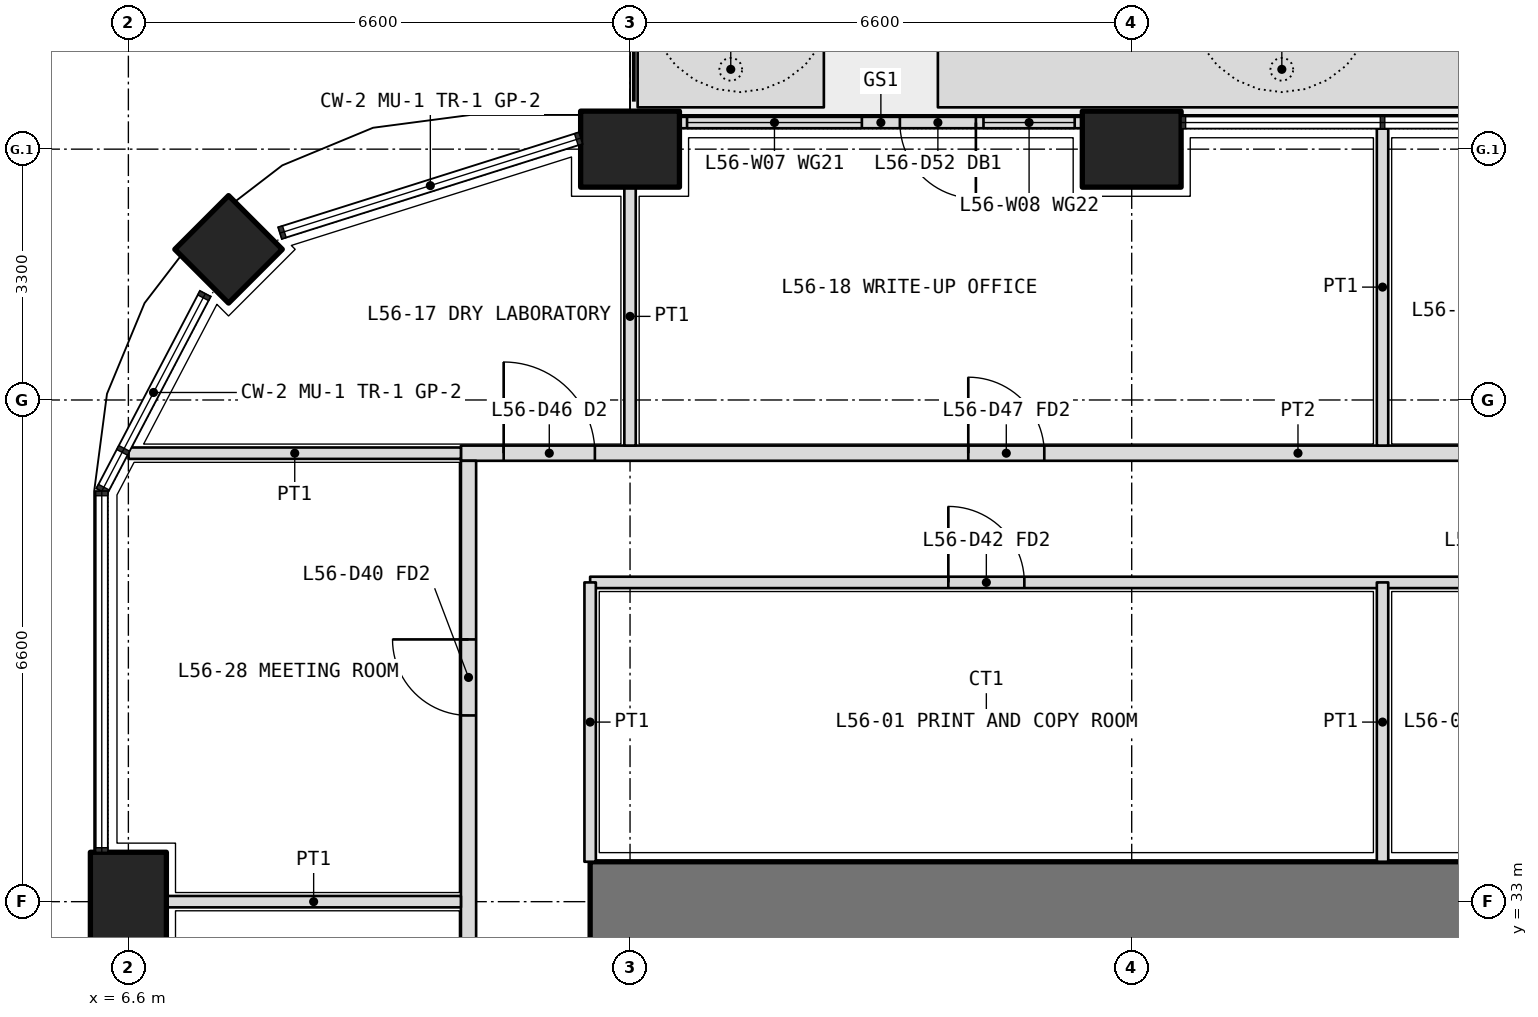
"""IFC4 building model, lengths in metres.
Left out: names, types, materials, properties, quantities, classifications, styles, units other than length and angle.
Written with IfcOpenShell. Run it as: python <this file> out.ifc"""

import sys

from ifc_helpers import new_model, si_unit, direction, frame, frame_2d, origin, origin_2d, place, context, subcontext, project, spatial, polyline, rectangle, outline, extrude, element, fill, save


model = new_model("IFC4")
c1 = context("Model", 3, precision=1e-05, world=origin(), true_north=direction((0.0, 1.0)))
c2 = subcontext(c1, "Body", "Model", "MODEL_VIEW")
j1 = project(units=[si_unit("LENGTHUNIT", "METRE"), si_unit("PLANEANGLEUNIT", "RADIAN")], contexts=[c1])
p1 = place(None, origin())
s1 = spatial("IfcSite", under=j1, at=p1, CompositionType="ELEMENT")
p2 = place(p1, origin())
s2 = spatial("IfcBuilding", under=s1, at=p2, CompositionType="ELEMENT")
p3 = place(p2, frame((0.0, 0.0, 246.0)))
s3 = spatial("IfcBuildingStorey", under=s2, at=p3, CompositionType="ELEMENT", Elevation=246.0)
p4 = place(p3, frame((7.918, 41.582, 0.0), z_axis=(0.0, 0.0, 1.0), x_axis=(0.707106781187, 0.707106781187, 0.0)))
e1 = element("IfcColumn", 1, at=p4, inside=s3, PredefinedType="COLUMN", context=c2, shape_type="SweptSolid", body=[
    extrude(rectangle(XDim=1.0, YDim=1.0, at=origin_2d()), origin(), (0.0, 0.0, 1.0), 4.2),
])
for number, where, z_axis, x_axis in (
    (2, (6.6, 33.0, 0.0), (0.0, 0.0, 1.0), (0.0, 1.0, 0.0)),
    (3, (13.2, 42.9, 0.0), (0.0, 0.0, 1.0), (1.0, 0.0, 0.0)),
    (4, (19.8, 42.9, 0.0), (0.0, 0.0, 1.0), (1.0, 0.0, 0.0)),
):
    element("IfcColumn", number, at=place(p3, frame(where, z_axis=z_axis, x_axis=x_axis)), inside=s3, PredefinedType="COLUMN", context=c2, shape_type="SweptSolid", body=[
        extrude(rectangle(XDim=1.3, YDim=1.0, at=origin_2d()), origin(), (0.0, 0.0, 1.0), 4.2),
    ])
p5 = place(p3, origin())
e5 = element("IfcWall", 5, at=p5, inside=s3, PredefinedType="USERDEFINED", context=c2, shape_type="SweptSolid", body=[
    extrude(outline(polyline([(13.3, 43.45), (15.75, 43.45), (15.75, 44.45), (13.3, 44.45), (13.3, 43.45)]), holes=[polyline([(13.45, 43.6), (15.6, 43.6), (15.6, 44.3), (13.45, 44.3), (13.45, 43.6)])]), origin(), (0.0, 0.0, 1.0), 1.05),
])
p6 = place(p3, origin())
e6 = element("IfcWall", 6, at=p6, inside=s3, PredefinedType="USERDEFINED", context=c2, shape_type="SweptSolid", body=[
    extrude(outline(polyline([(17.25, 43.45), (26.3, 43.45), (26.3, 44.45), (17.25, 44.45), (17.25, 43.45)]), holes=[polyline([(17.4, 43.6), (26.15, 43.6), (26.15, 44.3), (17.4, 44.3), (17.4, 43.6)])]), origin(), (0.0, 0.0, 1.0), 1.05),
])
p7 = place(p3, frame((19.15, 43.25, 0.0), z_axis=(0.0, 0.0, 1.0), x_axis=(-1.0, 0.0, 0.0)))
e7 = element("IfcWall", 7, at=p7, inside=s3, PredefinedType="SOLIDWALL", context=c2, shape_type="SweptSolid", body=[
    extrude(rectangle(XDim=5.3, YDim=0.15, at=frame_2d((2.65, 0.0))), origin(), (0.0, 0.0, 1.0), 2.7),
])
p8 = place(p7, frame((1.4, 0.0, 0.0)))
e8 = element("IfcOpeningElement", 8, at=p8, cuts=e7, PredefinedType="OPENING", context=c2, shape_type="SweptSolid", body=[
    extrude(rectangle(XDim=1.0, YDim=2.4, at=frame_2d((0.5, 1.2))), frame((0.0, 0.085, 0.0), z_axis=(0.0, -1.0, 0.0), x_axis=(1.0, 0.0, 0.0)), (0.0, 0.0, 1.0), 0.17),
])
p9 = place(p7, frame((0.1, 0.0, 0.1)))
e9 = element("IfcOpeningElement", 9, at=p9, cuts=e7, PredefinedType="OPENING", context=c2, shape_type="SweptSolid", body=[
    extrude(rectangle(XDim=1.2, YDim=2.3, at=frame_2d((0.6, 1.15))), frame((0.0, 0.085, 0.0), z_axis=(0.0, -1.0, 0.0), x_axis=(1.0, 0.0, 0.0)), (0.0, 0.0, 1.0), 0.17),
])
p10 = place(p7, frame((2.9, 0.0, 0.1)))
e10 = element("IfcOpeningElement", 10, at=p10, cuts=e7, PredefinedType="OPENING", context=c2, shape_type="SweptSolid", body=[
    extrude(rectangle(XDim=2.3, YDim=2.3, at=frame_2d((1.15, 1.15))), frame((0.0, 0.085, 0.0), z_axis=(0.0, -1.0, 0.0), x_axis=(1.0, 0.0, 0.0)), (0.0, 0.0, 1.0), 0.17),
])
p11 = place(p3, frame((40.125, 33.0, 0.0), z_axis=(0.0, 0.0, 1.0), x_axis=(-1.0, 0.0, 0.0)))
e11 = element("IfcWall", 11, at=p11, inside=s3, PredefinedType="SHEAR", context=c2, shape_type="SweptSolid", body=[
    extrude(rectangle(XDim=27.45, YDim=1.05, at=frame_2d((13.725, 0.0))), origin(), (0.0, 0.0, 1.0), 4.2),
])
p12 = place(p3, frame((12.675, 37.2, 0.0), z_axis=(0.0, 0.0, 1.0), x_axis=(1.0, 0.0, 0.0)))
e12 = element("IfcWall", 12, at=p12, inside=s3, PredefinedType="PARTITIONING", context=c2, shape_type="SweptSolid", body=[
    extrude(rectangle(XDim=27.45, YDim=0.15, at=frame_2d((13.725, 0.0))), origin(), (0.0, 0.0, 1.0), 3.0),
])
p13 = place(p12, frame((4.712, 0.0, 0.0)))
e13 = element("IfcOpeningElement", 13, at=p13, cuts=e12, PredefinedType="OPENING", context=c2, shape_type="SweptSolid", body=[
    extrude(rectangle(XDim=1.0, YDim=2.1, at=frame_2d((0.5, 1.05))), frame((0.0, 0.085, 0.0), z_axis=(0.0, -1.0, 0.0), x_axis=(1.0, 0.0, 0.0)), (0.0, 0.0, 1.0), 0.17),
])
p14 = place(p12, frame((11.575, 0.0, 0.0)))
e14 = element("IfcOpeningElement", 14, at=p14, cuts=e12, PredefinedType="OPENING", context=c2, shape_type="SweptSolid", body=[
    extrude(rectangle(XDim=1.0, YDim=2.1, at=frame_2d((0.5, 1.05))), frame((0.0, 0.085, 0.0), z_axis=(0.0, -1.0, 0.0), x_axis=(1.0, 0.0, 0.0)), (0.0, 0.0, 1.0), 0.17),
])
p15 = place(p12, frame((18.175, 0.0, 0.0)))
e15 = element("IfcOpeningElement", 15, at=p15, cuts=e12, PredefinedType="OPENING", context=c2, shape_type="SweptSolid", body=[
    extrude(rectangle(XDim=1.0, YDim=2.1, at=frame_2d((0.5, 1.05))), frame((0.0, 0.085, 0.0), z_axis=(0.0, -1.0, 0.0), x_axis=(1.0, 0.0, 0.0)), (0.0, 0.0, 1.0), 0.17),
])
p16 = place(p12, frame((25.038, 0.0, 0.0)))
e16 = element("IfcOpeningElement", 16, at=p16, cuts=e12, PredefinedType="OPENING", context=c2, shape_type="SweptSolid", body=[
    extrude(rectangle(XDim=1.0, YDim=2.1, at=frame_2d((0.5, 1.05))), frame((0.0, 0.085, 0.0), z_axis=(0.0, -1.0, 0.0), x_axis=(1.0, 0.0, 0.0)), (0.0, 0.0, 1.0), 0.17),
])
p17 = place(p3, frame((12.675, 33.525, 0.0), z_axis=(0.0, 0.0, 1.0), x_axis=(0.0, 1.0, 0.0)))
e17 = element("IfcWall", 17, at=p17, inside=s3, PredefinedType="PARTITIONING", context=c2, shape_type="SweptSolid", body=[
    extrude(rectangle(XDim=3.675, YDim=0.15, at=frame_2d((1.837, 0.0))), origin(), (0.0, 0.0, 1.0), 3.0),
])
p18 = place(p3, frame((23.1, 33.525, 0.0), z_axis=(0.0, 0.0, 1.0), x_axis=(0.0, 1.0, 0.0)))
e18 = element("IfcWall", 18, at=p18, inside=s3, PredefinedType="PARTITIONING", context=c2, shape_type="SweptSolid", body=[
    extrude(rectangle(XDim=3.675, YDim=0.15, at=frame_2d((1.837, 0.0))), origin(), (0.0, 0.0, 1.0), 3.9),
])
p19 = place(p3, frame((10.975, 38.9, 0.0), z_axis=(0.0, 0.0, 1.0), x_axis=(1.0, 0.0, 0.0)))
e19 = element("IfcWall", 19, at=p19, inside=s3, PredefinedType="PARTITIONING", context=c2, shape_type="SweptSolid", body=[
    extrude(rectangle(XDim=22.025, YDim=0.2, at=frame_2d((11.012, 0.0))), origin(), (0.0, 0.0, 1.0), 3.0),
])
p20 = place(p19, frame((0.562, 0.0, 0.0)))
e20 = element("IfcOpeningElement", 20, at=p20, cuts=e19, PredefinedType="OPENING", context=c2, shape_type="SweptSolid", body=[
    extrude(rectangle(XDim=1.2, YDim=2.1, at=frame_2d((0.6, 1.05))), frame((0.0, 0.11, 0.0), z_axis=(0.0, -1.0, 0.0), x_axis=(1.0, 0.0, 0.0)), (0.0, 0.0, 1.0), 0.22),
])
p21 = place(p19, frame((6.675, 0.0, 0.0)))
e21 = element("IfcOpeningElement", 21, at=p21, cuts=e19, PredefinedType="OPENING", context=c2, shape_type="SweptSolid", body=[
    extrude(rectangle(XDim=1.0, YDim=2.1, at=frame_2d((0.5, 1.05))), frame((0.0, 0.11, 0.0), z_axis=(0.0, -1.0, 0.0), x_axis=(1.0, 0.0, 0.0)), (0.0, 0.0, 1.0), 0.22),
])
p22 = place(p19, frame((13.725, 0.0, 0.0)))
e22 = element("IfcOpeningElement", 22, at=p22, cuts=e19, PredefinedType="OPENING", context=c2, shape_type="SweptSolid", body=[
    extrude(rectangle(XDim=1.0, YDim=2.1, at=frame_2d((0.5, 1.05))), frame((0.0, 0.11, 0.0), z_axis=(0.0, -1.0, 0.0), x_axis=(1.0, 0.0, 0.0)), (0.0, 0.0, 1.0), 0.22),
])
p23 = place(p19, frame((17.025, 0.0, 0.0)))
e23 = element("IfcOpeningElement", 23, at=p23, cuts=e19, PredefinedType="OPENING", context=c2, shape_type="SweptSolid", body=[
    extrude(rectangle(XDim=1.0, YDim=2.1, at=frame_2d((0.5, 1.05))), frame((0.0, 0.11, 0.0), z_axis=(0.0, -1.0, 0.0), x_axis=(1.0, 0.0, 0.0)), (0.0, 0.0, 1.0), 0.22),
])
p24 = place(p19, frame((19.875, 0.0, 0.0)))
e24 = element("IfcOpeningElement", 24, at=p24, cuts=e19, PredefinedType="OPENING", context=c2, shape_type="SweptSolid", body=[
    extrude(rectangle(XDim=1.0, YDim=2.1, at=frame_2d((0.5, 1.05))), frame((0.0, 0.11, 0.0), z_axis=(0.0, -1.0, 0.0), x_axis=(1.0, 0.0, 0.0)), (0.0, 0.0, 1.0), 0.22),
])
p25 = place(p3, frame((11.075, 7.4, 0.0), z_axis=(0.0, 0.0, 1.0), x_axis=(0.0, 1.0, 0.0)))
e25 = element("IfcWall", 25, at=p25, inside=s3, PredefinedType="PARTITIONING", context=c2, shape_type="SweptSolid", body=[
    extrude(rectangle(XDim=31.4, YDim=0.2, at=frame_2d((15.7, 0.0))), origin(), (0.0, 0.0, 1.0), 3.0),
])
p26 = place(p25, frame((2.35, 0.0, 0.0)))
e26 = element("IfcOpeningElement", 26, at=p26, cuts=e25, PredefinedType="OPENING", context=c2, shape_type="SweptSolid", body=[
    extrude(rectangle(XDim=1.0, YDim=2.1, at=frame_2d((0.5, 1.05))), frame((0.0, 0.11, 0.0), z_axis=(0.0, -1.0, 0.0), x_axis=(1.0, 0.0, 0.0)), (0.0, 0.0, 1.0), 0.22),
])
p27 = place(p25, frame((6.9, 0.0, 0.0)))
e27 = element("IfcOpeningElement", 27, at=p27, cuts=e25, PredefinedType="OPENING", context=c2, shape_type="SweptSolid", body=[
    extrude(rectangle(XDim=1.0, YDim=2.1, at=frame_2d((0.5, 1.05))), frame((0.0, 0.11, 0.0), z_axis=(0.0, -1.0, 0.0), x_axis=(1.0, 0.0, 0.0)), (0.0, 0.0, 1.0), 0.22),
])
p28 = place(p25, frame((10.35, 0.0, 0.0)))
e28 = element("IfcOpeningElement", 28, at=p28, cuts=e25, PredefinedType="OPENING", context=c2, shape_type="SweptSolid", body=[
    extrude(rectangle(XDim=0.9, YDim=2.1, at=frame_2d((0.45, 1.05))), frame((0.0, 0.11, 0.0), z_axis=(0.0, -1.0, 0.0), x_axis=(1.0, 0.0, 0.0)), (0.0, 0.0, 1.0), 0.22),
])
p29 = place(p25, frame((13.7, 0.0, 0.0)))
e29 = element("IfcOpeningElement", 29, at=p29, cuts=e25, PredefinedType="OPENING", context=c2, shape_type="SweptSolid", body=[
    extrude(rectangle(XDim=0.9, YDim=2.1, at=frame_2d((0.45, 1.05))), frame((0.0, 0.11, 0.0), z_axis=(0.0, -1.0, 0.0), x_axis=(1.0, 0.0, 0.0)), (0.0, 0.0, 1.0), 0.22),
])
p30 = place(p25, frame((20.15, 0.0, 0.0)))
e30 = element("IfcOpeningElement", 30, at=p30, cuts=e25, PredefinedType="OPENING", context=c2, shape_type="SweptSolid", body=[
    extrude(rectangle(XDim=1.0, YDim=2.1, at=frame_2d((0.5, 1.05))), frame((0.0, 0.11, 0.0), z_axis=(0.0, -1.0, 0.0), x_axis=(1.0, 0.0, 0.0)), (0.0, 0.0, 1.0), 0.22),
])
p31 = place(p25, frame((28.05, 0.0, 0.0)))
e31 = element("IfcOpeningElement", 31, at=p31, cuts=e25, PredefinedType="OPENING", context=c2, shape_type="SweptSolid", body=[
    extrude(rectangle(XDim=1.0, YDim=2.1, at=frame_2d((0.5, 1.05))), frame((0.0, 0.11, 0.0), z_axis=(0.0, -1.0, 0.0), x_axis=(1.0, 0.0, 0.0)), (0.0, 0.0, 1.0), 0.22),
])
p32 = place(p3, frame((6.603, 38.9, 0.0), z_axis=(0.0, 0.0, 1.0), x_axis=(1.0, 0.0, 0.0)))
e32 = element("IfcWall", 32, at=p32, inside=s3, PredefinedType="PARTITIONING", context=c2, shape_type="SweptSolid", body=[
    extrude(rectangle(XDim=4.373, YDim=0.15, at=frame_2d((2.186, 0.0))), origin(), (0.0, 0.0, 1.0), 2.7),
])
p33 = place(p3, frame((13.2, 42.4, 0.0), z_axis=(0.0, 0.0, 1.0), x_axis=(0.0, -1.0, 0.0)))
e33 = element("IfcWall", 33, at=p33, inside=s3, PredefinedType="PARTITIONING", context=c2, shape_type="SweptSolid", body=[
    extrude(rectangle(XDim=3.4, YDim=0.15, at=frame_2d((1.7, 0.0))), origin(), (0.0, 0.0, 1.0), 3.0),
])
p34 = place(p3, frame((23.1, 43.17, 0.0), z_axis=(0.0, 0.0, 1.0), x_axis=(0.0, -1.0, 0.0)))
e34 = element("IfcWall", 34, at=p34, inside=s3, PredefinedType="PARTITIONING", context=c2, shape_type="SweptSolid", body=[
    extrude(rectangle(XDim=4.17, YDim=0.15, at=frame_2d((2.085, 0.0))), origin(), (0.0, 0.0, 1.0), 2.7),
])
p35 = place(p3, frame((7.1, 33.0, 0.0), z_axis=(0.0, 0.0, 1.0), x_axis=(1.0, 0.0, 0.0)))
e35 = element("IfcWall", 35, at=p35, inside=s3, PredefinedType="PARTITIONING", context=c2, shape_type="SweptSolid", body=[
    extrude(rectangle(XDim=3.875, YDim=0.15, at=frame_2d((1.938, 0.0))), origin(), (0.0, 0.0, 1.0), 3.0),
])
p36 = place(p8, origin())
e36 = element("IfcDoor", 36, at=p36, inside=s3, OperationType="SINGLE_SWING_LEFT", PredefinedType="DOOR", context=c2, shape_type="SweptSolid", body=[
    extrude(rectangle(XDim=1.0, YDim=2.4, at=frame_2d((0.5, 1.2))), frame((0.0, 0.025, 0.0), z_axis=(0.0, -1.0, 0.0), x_axis=(1.0, 0.0, 0.0)), (0.0, 0.0, 1.0), 0.05),
])
fill(e8, e36)
p37 = place(p9, origin())
e37 = element("IfcWindow", 37, at=p37, inside=s3, PartitioningType="SINGLE_PANEL", PredefinedType="WINDOW", context=c2, shape_type="SweptSolid", body=[
    extrude(rectangle(XDim=1.2, YDim=2.3, at=frame_2d((0.6, 1.15))), frame((0.0, 0.03, 0.0), z_axis=(0.0, -1.0, 0.0), x_axis=(1.0, 0.0, 0.0)), (0.0, 0.0, 1.0), 0.06),
])
fill(e9, e37)
p38 = place(p10, origin())
e38 = element("IfcWindow", 38, at=p38, inside=s3, PartitioningType="SINGLE_PANEL", PredefinedType="WINDOW", context=c2, shape_type="SweptSolid", body=[
    extrude(rectangle(XDim=2.3, YDim=2.3, at=frame_2d((1.15, 1.15))), frame((0.0, 0.03, 0.0), z_axis=(0.0, -1.0, 0.0), x_axis=(1.0, 0.0, 0.0)), (0.0, 0.0, 1.0), 0.06),
])
fill(e10, e38)
p39 = place(p13, origin())
e39 = element("IfcDoor", 39, at=p39, inside=s3, OperationType="SINGLE_SWING_LEFT", PredefinedType="DOOR", context=c2, shape_type="SweptSolid", body=[
    extrude(rectangle(XDim=1.0, YDim=2.1, at=frame_2d((0.5, 1.05))), frame((0.0, 0.025, 0.0), z_axis=(0.0, -1.0, 0.0), x_axis=(1.0, 0.0, 0.0)), (0.0, 0.0, 1.0), 0.05),
])
fill(e13, e39)
p40 = place(p20, origin())
e40 = element("IfcDoor", 40, at=p40, inside=s3, OperationType="DOUBLE_DOOR_SINGLE_SWING", PredefinedType="DOOR", context=c2, shape_type="SweptSolid", body=[
    extrude(rectangle(XDim=1.2, YDim=2.1, at=frame_2d((0.6, 1.05))), frame((0.0, 0.025, 0.0), z_axis=(0.0, -1.0, 0.0), x_axis=(1.0, 0.0, 0.0)), (0.0, 0.0, 1.0), 0.05),
])
fill(e20, e40)
p41 = place(p21, origin())
e41 = element("IfcDoor", 41, at=p41, inside=s3, OperationType="SINGLE_SWING_LEFT", PredefinedType="DOOR", context=c2, shape_type="SweptSolid", body=[
    extrude(rectangle(XDim=1.0, YDim=2.1, at=frame_2d((0.5, 1.05))), frame((0.0, 0.025, 0.0), z_axis=(0.0, -1.0, 0.0), x_axis=(1.0, 0.0, 0.0)), (0.0, 0.0, 1.0), 0.05),
])
fill(e21, e41)
p42 = place(p31, origin())
e42 = element("IfcDoor", 42, at=p42, inside=s3, OperationType="SINGLE_SWING_RIGHT", PredefinedType="DOOR", context=c2, shape_type="SweptSolid", body=[
    extrude(rectangle(XDim=1.0, YDim=2.1, at=frame_2d((0.5, 1.05))), frame((0.0, 0.025, 0.0), z_axis=(0.0, -1.0, 0.0), x_axis=(1.0, 0.0, 0.0)), (0.0, 0.0, 1.0), 0.05),
])
fill(e31, e42)
save(model, sys.argv[1])
